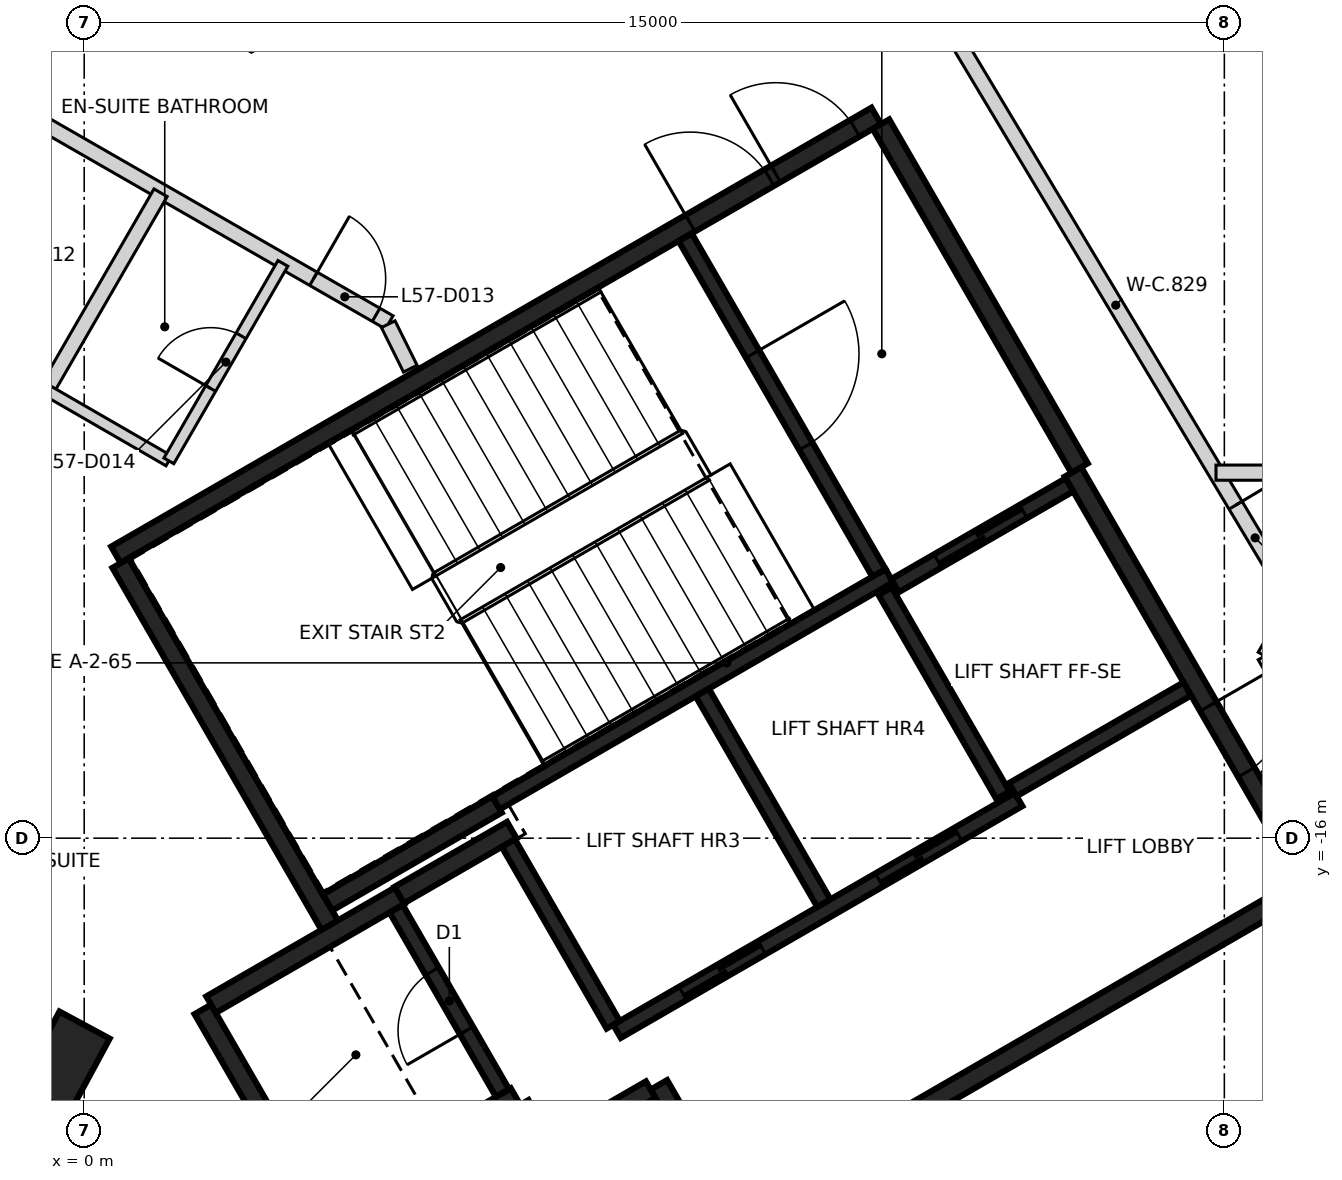
"""IFC4 building model, lengths in metres.
Left out: names, types, materials, properties, quantities, classifications, styles, units other than length and angle.
Written with IfcOpenShell. Run it as: python <this file> out.ifc"""

import sys

from ifc_helpers import new_model, si_unit, direction, frame, frame_2d, origin, origin_2d, place, context, subcontext, project, spatial, rectangle, extrude, element, fill, save


model = new_model("IFC4")
c1 = context("Model", 3, precision=1e-05, world=origin(), true_north=direction((0.0, 1.0)))
c2 = subcontext(c1, "Body", "Model", "MODEL_VIEW")
j1 = project(units=[si_unit("LENGTHUNIT", "METRE"), si_unit("PLANEANGLEUNIT", "RADIAN")], contexts=[c1])
p1 = place(None, origin())
s1 = spatial("IfcSite", under=j1, at=p1, CompositionType="ELEMENT")
p2 = place(p1, origin())
s2 = spatial("IfcBuilding", under=s1, at=p2, CompositionType="ELEMENT")
p3 = place(p2, frame((0.0, 0.0, 228.6)))
s3 = spatial("IfcBuildingStorey", under=s2, at=p3, CompositionType="ELEMENT", Elevation=228.6)
p4 = place(p3, frame((-0.256, -18.943, -0.35), z_axis=(0.0, 0.0, 1.0), x_axis=(0.474650552857, 0.880174330842, 0.0)))
e1 = element("IfcColumn", 1, at=p4, inside=s3, PredefinedType="COLUMN", context=c2, shape_type="SweptSolid", body=[
    extrude(rectangle(XDim=1.1, YDim=0.75, at=origin_2d()), origin(), (0.0, 0.0, 1.0), 3.6),
])
p5 = place(p3, frame((0.417, -12.273, 0.0), z_axis=(0.0, 0.0, 1.0), x_axis=(0.866021906294, 0.500006057782, 0.0)))
e2 = element("IfcWall", 2, at=p5, inside=s3, PredefinedType="SHEAR", context=c2, shape_type="SweptSolid", body=[
    extrude(rectangle(XDim=11.55, YDim=0.25, at=frame_2d((5.775, 0.0))), origin(), (0.0, 0.0, 1.0), 3.25),
])
p6 = place(p5, frame((10.025, 0.0, 0.0)))
e3 = element("IfcOpeningElement", 3, at=p6, cuts=e2, PredefinedType="OPENING", context=c2, shape_type="SweptSolid", body=[
    extrude(rectangle(XDim=1.2, YDim=2.1, at=frame_2d((0.6, 1.05))), frame((0.0, 0.135, 0.0), z_axis=(0.0, -1.0, 0.0), x_axis=(1.0, 0.0, 0.0)), (0.0, 0.0, 1.0), 0.27),
])
p7 = place(p5, frame((8.725, 0.0, 0.0)))
e4 = element("IfcOpeningElement", 4, at=p7, cuts=e2, PredefinedType="OPENING", context=c2, shape_type="SweptSolid", body=[
    extrude(rectangle(XDim=1.2, YDim=2.1, at=frame_2d((0.6, 1.05))), frame((0.0, 0.135, 0.0), z_axis=(0.0, -1.0, 0.0), x_axis=(1.0, 0.0, 0.0)), (0.0, 0.0, 1.0), 0.27),
])
p8 = place(p3, frame((16.133, -16.594, 0.0), z_axis=(0.0, 0.0, 1.0), x_axis=(-0.866022959057, -0.500004234368, 0.0)))
e5 = element("IfcWall", 5, at=p8, inside=s3, PredefinedType="SHEAR", context=c2, shape_type="SweptSolid", body=[
    extrude(rectangle(XDim=8.75, YDim=0.25, at=frame_2d((4.375, 0.0))), origin(), (0.0, 0.0, 1.0), 3.25),
])
p9 = place(p3, frame((13.008, -11.181, 0.0), z_axis=(0.0, 0.0, 1.0), x_axis=(0.500001955336, -0.866024274868, 0.0)))
e6 = element("IfcWall", 6, at=p9, inside=s3, PredefinedType="SHEAR", context=c2, shape_type="SweptSolid", body=[
    extrude(rectangle(XDim=6.125, YDim=0.25, at=frame_2d((3.062, 0.0))), origin(), (0.0, 0.0, 1.0), 3.25),
])
p10 = place(p9, frame((3.563, 0.0, 0.0)))
e7 = element("IfcOpeningElement", 7, at=p10, cuts=e6, PredefinedType="OPENING", context=c2, shape_type="SweptSolid", body=[
    extrude(rectangle(XDim=1.0, YDim=2.1, at=frame_2d((0.5, 1.05))), frame((0.0, 0.135, 0.0), z_axis=(0.0, -1.0, 0.0), x_axis=(1.0, 0.0, 0.0)), (0.0, 0.0, 1.0), 0.27),
])
p11 = place(p3, frame((3.235, -17.153, 0.0), z_axis=(0.0, 0.0, 1.0), x_axis=(-0.500008851346, 0.866020293397, 0.0)))
e8 = element("IfcWall", 8, at=p11, inside=s3, PredefinedType="SHEAR", context=c2, shape_type="SweptSolid", body=[
    extrude(rectangle(XDim=5.51, YDim=0.25, at=frame_2d((2.755, 0.0))), origin(), (0.0, 0.0, 1.0), 3.25),
])
p12 = place(p3, frame((10.483, -6.606, 0.0), z_axis=(0.0, 0.0, 1.0), x_axis=(0.49999885962, -0.866026062182, 0.0)))
e9 = element("IfcWall", 9, at=p12, inside=s3, PredefinedType="SHEAR", context=c2, shape_type="SweptSolid", body=[
    extrude(rectangle(XDim=5.225, YDim=0.25, at=frame_2d((2.612, 0.0))), origin(), (0.0, 0.0, 1.0), 3.25),
])
p13 = place(p3, frame((3.217, -21.122, 0.0), z_axis=(0.0, 0.0, 1.0), x_axis=(-0.499998874531, 0.866026053573, 0.0)))
e10 = element("IfcWall", 10, at=p13, inside=s3, PredefinedType="SHEAR", context=c2, shape_type="SweptSolid", body=[
    extrude(rectangle(XDim=3.313, YDim=0.25, at=frame_2d((1.656, 0.0))), origin(), (0.0, 0.0, 1.0), 3.25),
])
p14 = place(p3, frame((1.669, -18.19, 0.0), z_axis=(0.0, 0.0, 1.0), x_axis=(0.866042235819, 0.499970844928, 0.0)))
e11 = element("IfcWall", 11, at=p14, inside=s3, PredefinedType="SHEAR", context=c2, shape_type="SweptSolid", body=[
    extrude(rectangle(XDim=2.865, YDim=0.25, at=frame_2d((1.432, 0.0))), origin(), (0.0, 0.0, 1.0), 3.25),
])
p15 = place(p3, frame((5.675, -19.399, 0.0), z_axis=(0.0, 0.0, 1.0), x_axis=(-0.866026637627, -0.499997862916, 0.0)))
e12 = element("IfcWall", 12, at=p15, inside=s3, PredefinedType="SHEAR", context=c2, shape_type="SweptSolid", body=[
    extrude(rectangle(XDim=2.865, YDim=0.25, at=frame_2d((1.432, 0.0))), origin(), (0.0, 0.0, 1.0), 3.25),
])
p16 = place(p3, frame((5.431, -15.556, 0.0), z_axis=(0.0, 0.0, 1.0), x_axis=(-0.866022940537, -0.500004266446, 0.0)))
e13 = element("IfcWall", 13, at=p16, inside=s3, PredefinedType="SHEAR", context=c2, shape_type="SweptSolid", body=[
    extrude(rectangle(XDim=2.575, YDim=0.25, at=frame_2d((1.287, 0.0))), origin(), (0.0, 0.0, 1.0), 3.25),
])
p17 = place(p3, frame((8.493, -20.86, 0.0), z_axis=(0.0, 0.0, 1.0), x_axis=(-0.500039802285, 0.866002422705, 0.0)))
e14 = element("IfcWall", 14, at=p17, inside=s3, PredefinedType="SHEAR", context=c2, shape_type="SweptSolid", body=[
    extrude(rectangle(XDim=1.865, YDim=0.25, at=frame_2d((0.932, 0.0))), origin(), (0.0, 0.0, 1.0), 3.25),
])
p18 = place(p3, frame((4.145, -16.749, 0.0), z_axis=(0.0, 0.0, 1.0), x_axis=(0.866038183914, 0.499977863513, 0.0)))
e15 = element("IfcWall", 15, at=p18, inside=s3, PredefinedType="SHEAR", context=c2, shape_type="SweptSolid", body=[
    extrude(rectangle(XDim=1.71, YDim=0.25, at=frame_2d((0.855, 0.0))), origin(), (0.0, 0.0, 1.0), 3.25),
])
p19 = place(p3, frame((7.452, -19.308, 0.0), z_axis=(0.0, 0.0, 1.0), x_axis=(-0.866044474677, -0.49996696679, 0.0)))
e16 = element("IfcWall", 16, at=p19, inside=s3, PredefinedType="SHEAR", context=c2, shape_type="SweptSolid", body=[
    extrude(rectangle(XDim=1.584, YDim=0.25, at=frame_2d((0.792, 0.0))), origin(), (0.0, 0.0, 1.0), 3.25),
])
p20 = place(p3, frame((6.017, -19.992, 0.0), z_axis=(0.0, 0.0, 1.0), x_axis=(-0.500364886717, 0.865814633822, 0.0)))
e17 = element("IfcWall", 17, at=p20, inside=s3, PredefinedType="SHEAR", context=c2, shape_type="SweptSolid", body=[
    extrude(rectangle(XDim=0.559, YDim=0.25, at=frame_2d((0.28, 0.0))), origin(), (0.0, 0.0, 1.0), 3.25),
])
p21 = place(p3, frame((5.419, -15.534, 0.0), z_axis=(0.0, 0.0, 1.0), x_axis=(0.866029065029, 0.499993658486, 0.0)))
e18 = element("IfcWall", 18, at=p21, inside=s3, PredefinedType="SHEAR", context=c2, shape_type="SweptSolid", body=[
    extrude(rectangle(XDim=5.974, YDim=0.2, at=frame_2d((2.987, 0.0))), origin(), (0.0, 0.0, 1.0), 3.25),
])
p22 = place(p3, frame((7.01, -18.542, 0.0), z_axis=(0.0, 0.0, 1.0), x_axis=(0.866030299012, 0.499991521122, 0.0)))
e19 = element("IfcWall", 19, at=p22, inside=s3, PredefinedType="SHEAR", context=c2, shape_type="SweptSolid", body=[
    extrude(rectangle(XDim=6.1, YDim=0.2, at=frame_2d((3.05, 0.0))), origin(), (0.0, 0.0, 1.0), 3.25),
])
p23 = place(p22, frame((1.0, 0.0, 0.0)))
e20 = element("IfcOpeningElement", 20, at=p23, cuts=e19, PredefinedType="OPENING", context=c2, shape_type="SweptSolid", body=[
    extrude(rectangle(XDim=1.2, YDim=2.1, at=frame_2d((0.6, 1.05))), frame((0.0, 0.11, 0.0), z_axis=(0.0, -1.0, 0.0), x_axis=(1.0, 0.0, 0.0)), (0.0, 0.0, 1.0), 0.22),
])
p24 = place(p22, frame((3.982, 0.0, 0.0)))
e21 = element("IfcOpeningElement", 21, at=p24, cuts=e19, PredefinedType="OPENING", context=c2, shape_type="SweptSolid", body=[
    extrude(rectangle(XDim=1.2, YDim=2.1, at=frame_2d((0.6, 1.05))), frame((0.0, 0.11, 0.0), z_axis=(0.0, -1.0, 0.0), x_axis=(1.0, 0.0, 0.0)), (0.0, 0.0, 1.0), 0.22),
])
p25 = place(p3, frame((7.906, -8.094, 0.0), z_axis=(0.0, 0.0, 1.0), x_axis=(0.500027839223, -0.866009330205, 0.0)))
e22 = element("IfcWall", 22, at=p25, inside=s3, PredefinedType="SHEAR", context=c2, shape_type="SweptSolid", body=[
    extrude(rectangle(XDim=5.098, YDim=0.2, at=frame_2d((2.549, 0.0))), origin(), (0.0, 0.0, 1.0), 3.25),
])
p26 = place(p25, frame((1.774, 0.0, 0.0)))
e23 = element("IfcOpeningElement", 23, at=p26, cuts=e22, PredefinedType="OPENING", context=c2, shape_type="SweptSolid", body=[
    extrude(rectangle(XDim=1.4, YDim=2.1, at=frame_2d((0.7, 1.05))), frame((0.0, 0.11, 0.0), z_axis=(0.0, -1.0, 0.0), x_axis=(1.0, 0.0, 0.0)), (0.0, 0.0, 1.0), 0.22),
])
p27 = place(p3, frame((8.132, -14.084, 0.0), z_axis=(0.0, 0.0, 1.0), x_axis=(0.499997778408, -0.866026686418, 0.0)))
e24 = element("IfcWall", 24, at=p27, inside=s3, PredefinedType="SHEAR", context=c2, shape_type="SweptSolid", body=[
    extrude(rectangle(XDim=3.198, YDim=0.2, at=frame_2d((1.599, 0.0))), origin(), (0.0, 0.0, 1.0), 3.25),
])
p28 = place(p3, frame((5.503, -19.352, 0.0), z_axis=(0.0, 0.0, 1.0), x_axis=(-0.499986818241, 0.866033014143, 0.0)))
e25 = element("IfcWall", 25, at=p28, inside=s3, PredefinedType="SHEAR", context=c2, shape_type="SweptSolid", body=[
    extrude(rectangle(XDim=2.798, YDim=0.2, at=frame_2d((1.399, 0.0))), origin(), (0.0, 0.0, 1.0), 3.25),
])
p29 = place(p28, frame((0.949, 0.0, 0.0)))
e26 = element("IfcOpeningElement", 26, at=p29, cuts=e25, PredefinedType="OPENING", context=c2, shape_type="SweptSolid", body=[
    extrude(rectangle(XDim=0.9, YDim=2.1, at=frame_2d((0.45, 1.05))), frame((0.0, 0.11, 0.0), z_axis=(0.0, -1.0, 0.0), x_axis=(1.0, 0.0, 0.0)), (0.0, 0.0, 1.0), 0.22),
])
p30 = place(p3, frame((6.96, -18.455, 0.0), z_axis=(0.0, 0.0, 1.0), x_axis=(-0.499926705758, 0.866067716099, 0.0)))
e27 = element("IfcWall", 27, at=p30, inside=s3, PredefinedType="SHEAR", context=c2, shape_type="SweptSolid", body=[
    extrude(rectangle(XDim=2.759, YDim=0.2, at=frame_2d((1.38, 0.0))), origin(), (0.0, 0.0, 1.0), 3.25),
])
p31 = place(p3, frame((12.088, -15.437, 0.0), z_axis=(0.0, 0.0, 1.0), x_axis=(-0.500026960575, 0.86600983753, 0.0)))
e28 = element("IfcWall", 28, at=p31, inside=s3, PredefinedType="SHEAR", context=c2, shape_type="SweptSolid", body=[
    extrude(rectangle(XDim=3.1, YDim=0.2, at=frame_2d((1.55, 0.0))), origin(), (0.0, 0.0, 1.0), 3.25),
])
p32 = place(p3, frame((10.666, -12.678, 0.0), z_axis=(0.0, 0.0, 1.0), x_axis=(0.866018407898, 0.500012117035, 0.0)))
e29 = element("IfcWall", 29, at=p32, inside=s3, PredefinedType="SHEAR", context=c2, shape_type="SweptSolid", body=[
    extrude(rectangle(XDim=2.651, YDim=0.2, at=frame_2d((1.325, 0.0))), origin(), (0.0, 0.0, 1.0), 3.25),
])
p33 = place(p32, frame((0.652, 0.0, 0.0)))
e30 = element("IfcOpeningElement", 30, at=p33, cuts=e29, PredefinedType="OPENING", context=c2, shape_type="SweptSolid", body=[
    extrude(rectangle(XDim=1.3, YDim=2.1, at=frame_2d((0.65, 1.05))), frame((0.0, 0.11, 0.0), z_axis=(0.0, -1.0, 0.0), x_axis=(1.0, 0.0, 0.0)), (0.0, 0.0, 1.0), 0.22),
])
p34 = place(p3, frame((14.512, -14.037, 0.0), z_axis=(0.0, 0.0, 1.0), x_axis=(-0.866018407898, -0.500012117035, 0.0)))
e31 = element("IfcWall", 31, at=p34, inside=s3, PredefinedType="SHEAR", context=c2, shape_type="SweptSolid", body=[
    extrude(rectangle(XDim=2.651, YDim=0.2, at=frame_2d((1.325, 0.0))), origin(), (0.0, 0.0, 1.0), 3.25),
])
p35 = place(p3, frame((-7.089, -2.836, 0.0), z_axis=(0.0, 0.0, 1.0), x_axis=(0.867106243364, -0.498123240493, 0.0)))
e32 = element("IfcWall", 32, at=p35, inside=s3, PredefinedType="PARTITIONING", context=c2, shape_type="SweptSolid", body=[
    extrude(rectangle(XDim=12.804, YDim=0.2, at=frame_2d((6.402, 0.0))), origin(), (0.0, 0.0, 1.0), 3.25),
])
p36 = place(p35, frame((1.909, 0.0, 0.0)))
e33 = element("IfcOpeningElement", 33, at=p36, cuts=e32, PredefinedType="OPENING", context=c2, shape_type="SweptSolid", body=[
    extrude(rectangle(XDim=1.0, YDim=2.1, at=frame_2d((0.5, 1.05))), frame((0.0, 0.11, 0.0), z_axis=(0.0, -1.0, 0.0), x_axis=(1.0, 0.0, 0.0)), (0.0, 0.0, 1.0), 0.22),
])
p37 = place(p35, frame((4.91, 0.0, 0.0)))
e34 = element("IfcOpeningElement", 34, at=p37, cuts=e32, PredefinedType="OPENING", context=c2, shape_type="SweptSolid", body=[
    extrude(rectangle(XDim=0.95, YDim=2.1, at=frame_2d((0.475, 1.05))), frame((0.0, 0.11, 0.0), z_axis=(0.0, -1.0, 0.0), x_axis=(1.0, 0.0, 0.0)), (0.0, 0.0, 1.0), 0.22),
])
p38 = place(p35, frame((11.654, 0.0, 0.0)))
e35 = element("IfcOpeningElement", 35, at=p38, cuts=e32, PredefinedType="OPENING", context=c2, shape_type="SweptSolid", body=[
    extrude(rectangle(XDim=0.95, YDim=2.1, at=frame_2d((0.475, 1.05))), frame((0.0, 0.11, 0.0), z_axis=(0.0, -1.0, 0.0), x_axis=(1.0, 0.0, 0.0)), (0.0, 0.0, 1.0), 0.22),
])
p39 = place(p3, frame((4.0, -9.238, 0.0), z_axis=(0.0, 0.0, 1.0), x_axis=(0.444370954227, -0.89584287408, 0.0)))
e36 = element("IfcWall", 36, at=p39, inside=s3, PredefinedType="PARTITIONING", context=c2, shape_type="SweptSolid", body=[
    extrude(rectangle(XDim=0.653, YDim=0.2, at=frame_2d((0.327, 0.0))), origin(), (0.0, 0.0, 1.0), 3.25),
])
p40 = place(p3, frame((11.217, -5.058, 0.0), z_axis=(0.0, 0.0, 1.0), x_axis=(0.513856906336, -0.857875911662, 0.0)))
e37 = element("IfcWall", 37, at=p40, inside=s3, PredefinedType="PARTITIONING", context=c2, shape_type="SweptSolid", body=[
    extrude(rectangle(XDim=9.163, YDim=0.2, at=frame_2d((4.581, 0.0))), origin(), (0.0, 0.0, 1.0), 3.25),
])
p41 = place(p40, frame((7.65, 0.0, 0.0)))
e38 = element("IfcOpeningElement", 38, at=p41, cuts=e37, PredefinedType="OPENING", context=c2, shape_type="SweptSolid", body=[
    extrude(rectangle(XDim=1.0, YDim=2.1, at=frame_2d((0.5, 1.05))), frame((0.0, 0.11, 0.0), z_axis=(0.0, -1.0, 0.0), x_axis=(1.0, 0.0, 0.0)), (0.0, 0.0, 1.0), 0.22),
])
p42 = place(p3, frame((15.55, -15.213, 0.0), z_axis=(0.0, 0.0, 1.0), x_axis=(0.865989998118, 0.500061319399, 0.0)))
e39 = element("IfcWall", 39, at=p42, inside=s3, PredefinedType="PARTITIONING", context=c2, shape_type="SweptSolid", body=[
    extrude(rectangle(XDim=0.79, YDim=0.2, at=frame_2d((0.395, 0.0))), origin(), (0.0, 0.0, 1.0), 2.35),
])
p43 = place(p3, frame((15.532, -13.603, 0.0), z_axis=(0.0, 0.0, 1.0), x_axis=(0.498203662485, 0.867060038686, 0.0)))
e40 = element("IfcWall", 40, at=p43, inside=s3, PredefinedType="PARTITIONING", context=c2, shape_type="SweptSolid", body=[
    extrude(rectangle(XDim=0.789, YDim=0.2, at=frame_2d((0.395, 0.0))), origin(), (0.0, 0.0, 1.0), 3.25),
])
p44 = place(p3, frame((15.532, -13.603, 0.0), z_axis=(0.0, 0.0, 1.0), x_axis=(0.500199332748, -0.865910288378, 0.0)))
e41 = element("IfcWall", 41, at=p44, inside=s3, PredefinedType="PARTITIONING", context=c2, shape_type="SweptSolid", body=[
    extrude(rectangle(XDim=1.403, YDim=0.2, at=frame_2d((0.702, 0.0))), origin(), (0.0, 0.0, 1.0), 2.35),
])
p45 = place(p3, frame((-5.097, -18.078, 0.0), z_axis=(0.0, 0.0, 1.0), x_axis=(0.499960272111, 0.866048339477, 0.0)))
e42 = element("IfcWall", 42, at=p45, inside=s3, PredefinedType="PARTITIONING", context=c2, shape_type="SweptSolid", body=[
    extrude(rectangle(XDim=12.204, YDim=0.2, at=frame_2d((6.102, 0.0))), origin(), (0.0, 0.0, 1.0), 3.25),
])
p46 = place(p3, frame((14.89, -11.191, 0.0), z_axis=(0.0, 0.0, 1.0), x_axis=(1.0, 0.0, 0.0)))
e43 = element("IfcWall", 43, at=p46, inside=s3, PredefinedType="PARTITIONING", context=c2, shape_type="SweptSolid", body=[
    extrude(rectangle(XDim=3.142, YDim=0.2, at=frame_2d((1.571, 0.0))), origin(), (0.0, 0.0, 1.0), 2.35),
])
p47 = place(p3, frame((-2.833, -8.757, 0.0), z_axis=(0.0, 0.0, 1.0), x_axis=(0.866002713795, -0.500039298155, 0.0)))
e44 = element("IfcWall", 44, at=p47, inside=s3, PredefinedType="PARTITIONING", context=c2, shape_type="SweptSolid", body=[
    extrude(rectangle(XDim=4.558, YDim=0.15, at=frame_2d((2.279, 0.0))), origin(), (0.0, 0.0, 1.0), 3.25),
])
p48 = place(p3, frame((1.114, -11.036, 0.0), z_axis=(0.0, 0.0, 1.0), x_axis=(0.50002537861, 0.866010750942, 0.0)))
e45 = element("IfcWall", 45, at=p48, inside=s3, PredefinedType="PARTITIONING", context=c2, shape_type="SweptSolid", body=[
    extrude(rectangle(XDim=3.0, YDim=0.15, at=frame_2d((1.5, 0.0))), origin(), (0.0, 0.0, 1.0), 3.25),
])
p49 = place(p48, frame((1.1, 0.0, 0.0)))
e46 = element("IfcOpeningElement", 46, at=p49, cuts=e45, PredefinedType="OPENING", context=c2, shape_type="SweptSolid", body=[
    extrude(rectangle(XDim=0.8, YDim=2.1, at=frame_2d((0.4, 1.05))), frame((0.0, 0.085, 0.0), z_axis=(0.0, -1.0, 0.0), x_axis=(1.0, 0.0, 0.0)), (0.0, 0.0, 1.0), 0.17),
])
p50 = place(p33, origin())
e47 = element("IfcDoor", 47, at=p50, inside=s3, OperationType="SLIDING_TO_RIGHT", PredefinedType="DOOR", context=c2, shape_type="SweptSolid", body=[
    extrude(rectangle(XDim=1.3, YDim=2.1, at=frame_2d((0.65, 1.05))), frame((0.0, 0.025, 0.0), z_axis=(0.0, -1.0, 0.0), x_axis=(1.0, 0.0, 0.0)), (0.0, 0.0, 1.0), 0.05),
])
fill(e30, e47)
p51 = place(p23, origin())
e48 = element("IfcDoor", 48, at=p51, inside=s3, OperationType="DOUBLE_DOOR_SLIDING", PredefinedType="DOOR", context=c2, shape_type="SweptSolid", body=[
    extrude(rectangle(XDim=1.2, YDim=2.1, at=frame_2d((0.6, 1.05))), frame((0.0, 0.025, 0.0), z_axis=(0.0, -1.0, 0.0), x_axis=(1.0, 0.0, 0.0)), (0.0, 0.0, 1.0), 0.05),
])
fill(e20, e48)
p52 = place(p24, origin())
e49 = element("IfcDoor", 49, at=p52, inside=s3, OperationType="DOUBLE_DOOR_SLIDING", PredefinedType="DOOR", context=c2, shape_type="SweptSolid", body=[
    extrude(rectangle(XDim=1.2, YDim=2.1, at=frame_2d((0.6, 1.05))), frame((0.0, 0.025, 0.0), z_axis=(0.0, -1.0, 0.0), x_axis=(1.0, 0.0, 0.0)), (0.0, 0.0, 1.0), 0.05),
])
fill(e21, e49)
p53 = place(p10, origin())
e50 = element("IfcDoor", 50, at=p53, inside=s3, OperationType="SINGLE_SWING_LEFT", PredefinedType="DOOR", context=c2, shape_type="SweptSolid", body=[
    extrude(rectangle(XDim=1.0, YDim=2.1, at=frame_2d((0.5, 1.05))), frame((0.0, 0.025, 0.0), z_axis=(0.0, -1.0, 0.0), x_axis=(1.0, 0.0, 0.0)), (0.0, 0.0, 1.0), 0.05),
])
fill(e7, e50)
p54 = place(p6, origin())
e51 = element("IfcDoor", 51, at=p54, inside=s3, OperationType="SINGLE_SWING_LEFT", PredefinedType="DOOR", context=c2, shape_type="SweptSolid", body=[
    extrude(rectangle(XDim=1.2, YDim=2.1, at=frame_2d((0.6, 1.05))), frame((0.0, 0.025, 0.0), z_axis=(0.0, -1.0, 0.0), x_axis=(1.0, 0.0, 0.0)), (0.0, 0.0, 1.0), 0.05),
])
fill(e3, e51)
p55 = place(p7, origin())
e52 = element("IfcDoor", 52, at=p55, inside=s3, OperationType="SINGLE_SWING_RIGHT", PredefinedType="DOOR", context=c2, shape_type="SweptSolid", body=[
    extrude(rectangle(XDim=1.2, YDim=2.1, at=frame_2d((0.6, 1.05))), frame((0.0, 0.025, 0.0), z_axis=(0.0, -1.0, 0.0), x_axis=(1.0, 0.0, 0.0)), (0.0, 0.0, 1.0), 0.05),
])
fill(e4, e52)
p56 = place(p26, origin())
e53 = element("IfcDoor", 53, at=p56, inside=s3, OperationType="SINGLE_SWING_RIGHT", PredefinedType="DOOR", context=c2, shape_type="SweptSolid", body=[
    extrude(rectangle(XDim=1.4, YDim=2.1, at=frame_2d((0.7, 1.05))), frame((0.0, 0.025, 0.0), z_axis=(0.0, -1.0, 0.0), x_axis=(1.0, 0.0, 0.0)), (0.0, 0.0, 1.0), 0.05),
])
fill(e23, e53)
p57 = place(p29, origin())
e54 = element("IfcDoor", 54, at=p57, inside=s3, OperationType="SINGLE_SWING_LEFT", PredefinedType="DOOR", context=c2, shape_type="SweptSolid", body=[
    extrude(rectangle(XDim=0.9, YDim=2.1, at=frame_2d((0.45, 1.05))), frame((0.0, 0.025, 0.0), z_axis=(0.0, -1.0, 0.0), x_axis=(1.0, 0.0, 0.0)), (0.0, 0.0, 1.0), 0.05),
])
fill(e26, e54)
p58 = place(p38, frame((0.95, 0.0, 0.0), z_axis=(0.0, 0.0, 1.0), x_axis=(-1.0, 0.0, 0.0)))
e55 = element("IfcDoor", 55, at=p58, inside=s3, OperationType="SINGLE_SWING_LEFT", PredefinedType="DOOR", context=c2, shape_type="SweptSolid", body=[
    extrude(rectangle(XDim=0.95, YDim=2.1, at=frame_2d((0.475, 1.05))), frame((0.0, 0.025, 0.0), z_axis=(0.0, -1.0, 0.0), x_axis=(1.0, 0.0, 0.0)), (0.0, 0.0, 1.0), 0.05),
])
fill(e35, e55)
p59 = place(p49, origin())
e56 = element("IfcDoor", 56, at=p59, inside=s3, OperationType="SINGLE_SWING_LEFT", PredefinedType="DOOR", context=c2, shape_type="SweptSolid", body=[
    extrude(rectangle(XDim=0.8, YDim=2.1, at=frame_2d((0.4, 1.05))), frame((0.0, 0.025, 0.0), z_axis=(0.0, -1.0, 0.0), x_axis=(1.0, 0.0, 0.0)), (0.0, 0.0, 1.0), 0.05),
])
fill(e46, e56)
p60 = place(p41, frame((1.0, 0.0, 0.0), z_axis=(0.0, 0.0, 1.0), x_axis=(-1.0, 0.0, 0.0)))
e57 = element("IfcDoor", 57, at=p60, inside=s3, OperationType="SINGLE_SWING_LEFT", PredefinedType="DOOR", context=c2, shape_type="SweptSolid", body=[
    extrude(rectangle(XDim=1.0, YDim=2.1, at=frame_2d((0.5, 1.05))), frame((0.0, 0.025, 0.0), z_axis=(0.0, -1.0, 0.0), x_axis=(1.0, 0.0, 0.0)), (0.0, 0.0, 1.0), 0.05),
])
fill(e38, e57)
save(model, sys.argv[1])
